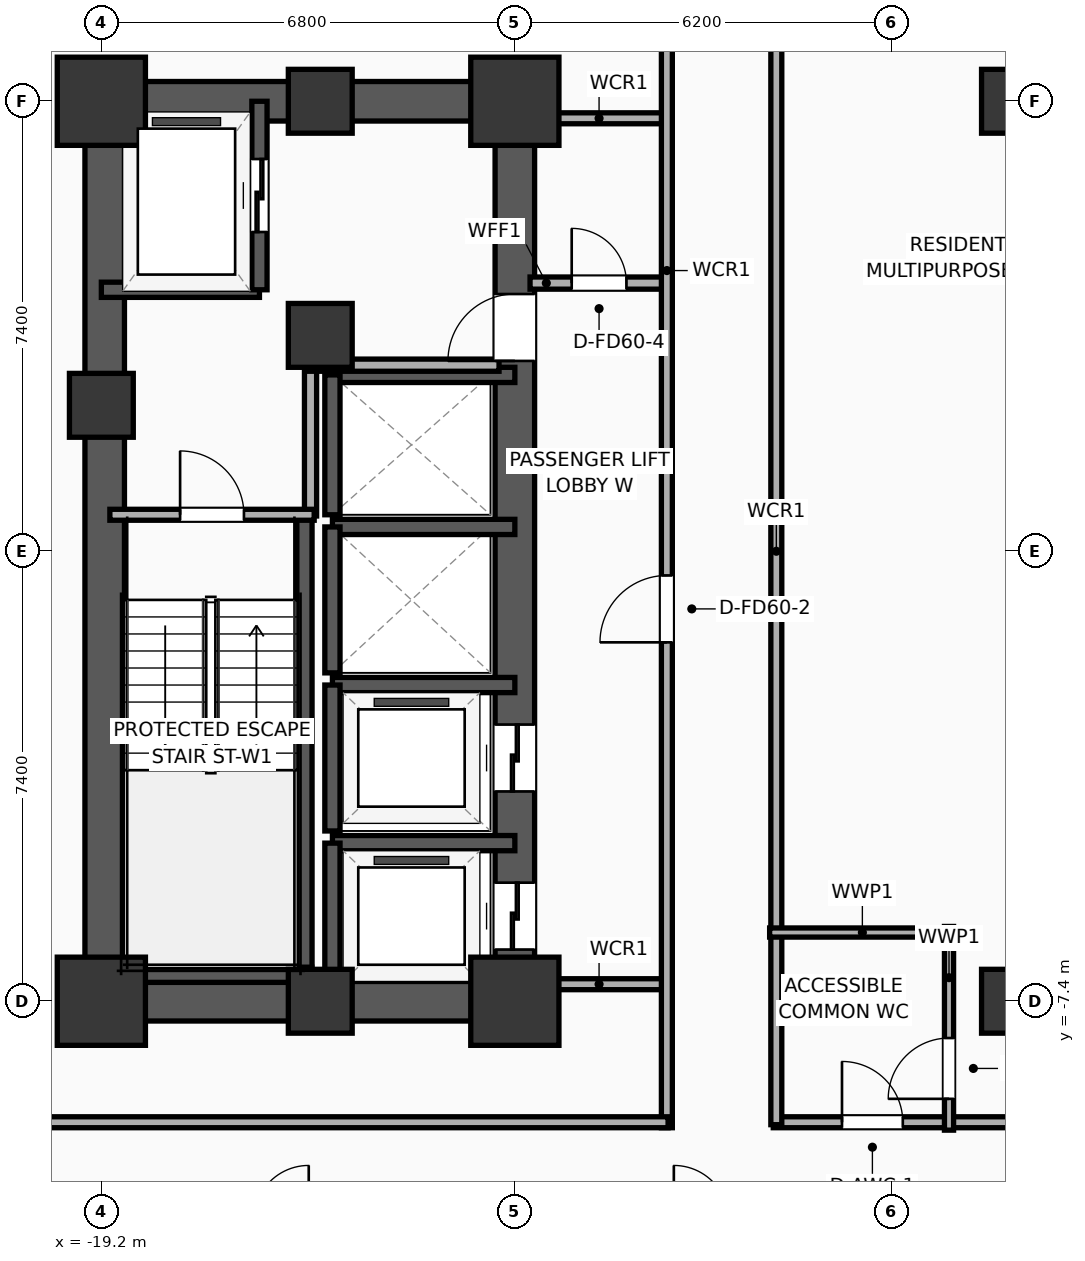
"""IFC4 building model, lengths in metres.
Left out: names, types, materials, properties, quantities, classifications, styles, units other than length and angle.
Written with IfcOpenShell. Run it as: python <this file> out.ifc"""

import sys

from ifc_helpers import new_model, si_unit, direction, frame, frame_2d, origin, origin_2d, place, context, subcontext, project, spatial, rectangle, extrude, element, fill, save


model = new_model("IFC4")
c1 = context("Model", 3, precision=1e-05, world=origin(), true_north=direction((0.0, 1.0)))
c2 = subcontext(c1, "Body", "Model", "MODEL_VIEW")
j1 = project(units=[si_unit("LENGTHUNIT", "METRE"), si_unit("PLANEANGLEUNIT", "RADIAN")], contexts=[c1])
p1 = place(None, origin())
s1 = spatial("IfcSite", under=j1, at=p1, CompositionType="ELEMENT")
p2 = place(p1, origin())
s2 = spatial("IfcBuilding", under=s1, at=p2, CompositionType="ELEMENT")
p3 = place(p2, frame((0.0, 0.0, 65.0)))
s3 = spatial("IfcBuildingStorey", under=s2, at=p3, CompositionType="ELEMENT", Elevation=65.0)
p4 = place(p3, frame((-19.2, -7.4, 0.0), z_axis=(0.0, 0.0, 1.0), x_axis=(1.0, 0.0, 0.0)))
e1 = element("IfcColumn", 1, at=p4, inside=s3, PredefinedType="COLUMN", context=c2, shape_type="SweptSolid", body=[
    extrude(rectangle(XDim=1.45, YDim=1.45, at=origin_2d()), origin(), (0.0, 0.0, 1.0), 3.9),
])
p5 = place(p3, frame((-19.2, 2.4, 0.0), z_axis=(0.0, 0.0, 1.0), x_axis=(1.0, 0.0, 0.0)))
e2 = element("IfcColumn", 2, at=p5, inside=s3, PredefinedType="COLUMN", context=c2, shape_type="SweptSolid", body=[
    extrude(rectangle(XDim=1.05, YDim=1.05, at=origin_2d()), origin(), (0.0, 0.0, 1.0), 3.9),
])
p6 = place(p3, frame((-19.2, 7.4, 0.0), z_axis=(0.0, 0.0, 1.0), x_axis=(1.0, 0.0, 0.0)))
e3 = element("IfcColumn", 3, at=p6, inside=s3, PredefinedType="COLUMN", context=c2, shape_type="SweptSolid", body=[
    extrude(rectangle(XDim=1.45, YDim=1.45, at=origin_2d()), origin(), (0.0, 0.0, 1.0), 3.9),
])
for number, where, z_axis, x_axis in (
    (4, (-15.6, -7.4, 0.0), (0.0, 0.0, 1.0), (1.0, 0.0, 0.0)),
    (5, (-15.6, 7.4, 0.0), (0.0, 0.0, 1.0), (1.0, 0.0, 0.0)),
):
    element("IfcColumn", number, at=place(p3, frame(where, z_axis=z_axis, x_axis=x_axis)), inside=s3, PredefinedType="COLUMN", context=c2, shape_type="SweptSolid", body=[
        extrude(rectangle(XDim=1.05, YDim=1.05, at=origin_2d()), origin(), (0.0, 0.0, 1.0), 3.9),
    ])
p7 = place(p3, frame((-12.4, -7.4, 0.0), z_axis=(0.0, 0.0, 1.0), x_axis=(1.0, 0.0, 0.0)))
e6 = element("IfcColumn", 6, at=p7, inside=s3, PredefinedType="COLUMN", context=c2, shape_type="SweptSolid", body=[
    extrude(rectangle(XDim=1.45, YDim=1.45, at=origin_2d()), origin(), (0.0, 0.0, 1.0), 3.9),
])
p8 = place(p3, frame((-15.6, 3.55, 0.0), z_axis=(0.0, 0.0, 1.0), x_axis=(1.0, 0.0, 0.0)))
e7 = element("IfcColumn", 7, at=p8, inside=s3, PredefinedType="COLUMN", context=c2, shape_type="SweptSolid", body=[
    extrude(rectangle(XDim=1.05, YDim=1.05, at=origin_2d()), origin(), (0.0, 0.0, 1.0), 3.9),
])
p9 = place(p3, frame((-12.4, 7.4, 0.0), z_axis=(0.0, 0.0, 1.0), x_axis=(1.0, 0.0, 0.0)))
e8 = element("IfcColumn", 8, at=p9, inside=s3, PredefinedType="COLUMN", context=c2, shape_type="SweptSolid", body=[
    extrude(rectangle(XDim=1.45, YDim=1.45, at=origin_2d()), origin(), (0.0, 0.0, 1.0), 3.9),
])
for number, where, z_axis, x_axis in (
    (9, (-19.525, -7.4, 0.0), (0.0, 0.0, 1.0), (1.0, 0.0, 0.0)),
    (10, (-19.525, 7.4, 0.0), (0.0, 0.0, 1.0), (1.0, 0.0, 0.0)),
):
    element("IfcWall", number, at=place(p3, frame(where, z_axis=z_axis, x_axis=x_axis)), inside=s3, PredefinedType="SHEAR", context=c2, shape_type="SweptSolid", body=[
        extrude(rectangle(XDim=7.45, YDim=0.65, at=frame_2d((3.725, 0.0))), origin(), (0.0, 0.0, 1.0), 3.65),
    ])
p10 = place(p3, frame((-19.145, -7.4, 0.0), z_axis=(0.0, 0.0, 1.0), x_axis=(0.0, 1.0, 0.0)))
e11 = element("IfcWall", 11, at=p10, inside=s3, PredefinedType="SHEAR", context=c2, shape_type="SweptSolid", body=[
    extrude(rectangle(XDim=14.8, YDim=0.65, at=frame_2d((7.4, 0.0))), origin(), (0.0, 0.0, 1.0), 3.65),
])
p11 = place(p3, frame((-12.4, -7.4, 0.0), z_axis=(0.0, 0.0, 1.0), x_axis=(0.0, 1.0, 0.0)))
e12 = element("IfcWall", 12, at=p11, inside=s3, PredefinedType="SHEAR", context=c2, shape_type="SweptSolid", body=[
    extrude(rectangle(XDim=14.8, YDim=0.65, at=frame_2d((7.4, 0.0))), origin(), (0.0, 0.0, 1.0), 3.65),
])
p12 = place(p11, frame((0.85, 0.0, 0.0)))
e13 = element("IfcOpeningElement", 13, at=p12, cuts=e12, PredefinedType="OPENING", context=c2, shape_type="SweptSolid", body=[
    extrude(rectangle(XDim=1.1, YDim=2.05, at=frame_2d((0.55, 1.025))), frame((0.0, 0.335, 0.0), z_axis=(0.0, -1.0, 0.0), x_axis=(1.0, 0.0, 0.0)), (0.0, 0.0, 1.0), 0.67),
])
p13 = place(p11, frame((3.45, 0.0, 0.0)))
e14 = element("IfcOpeningElement", 14, at=p13, cuts=e12, PredefinedType="OPENING", context=c2, shape_type="SweptSolid", body=[
    extrude(rectangle(XDim=1.1, YDim=2.05, at=frame_2d((0.55, 1.025))), frame((0.0, 0.335, 0.0), z_axis=(0.0, -1.0, 0.0), x_axis=(1.0, 0.0, 0.0)), (0.0, 0.0, 1.0), 0.67),
])
p14 = place(p11, frame((10.53, 0.0, 0.0)))
e15 = element("IfcOpeningElement", 15, at=p14, cuts=e12, PredefinedType="OPENING", context=c2, shape_type="SweptSolid", body=[
    extrude(rectangle(XDim=1.1, YDim=2.05, at=frame_2d((0.55, 1.025))), frame((0.0, 0.335, 0.0), z_axis=(0.0, -1.0, 0.0), x_axis=(1.0, 0.0, 0.0)), (0.0, 0.0, 1.0), 0.67),
])
p15 = place(p3, frame((-15.86, -7.085, 0.0), z_axis=(0.0, 0.0, 1.0), x_axis=(0.0, 1.0, 0.0)))
e16 = element("IfcWall", 16, at=p15, inside=s3, PredefinedType="SOLIDWALL", context=c2, shape_type="SweptSolid", body=[
    extrude(rectangle(XDim=7.685, YDim=0.25, at=frame_2d((3.843, 0.0))), origin(), (0.0, 0.0, 1.0), 3.65),
])
p16 = place(p3, frame((-19.2, -6.965, 0.0), z_axis=(0.0, 0.0, 1.0), x_axis=(1.0, 0.0, 0.0)))
e17 = element("IfcWall", 17, at=p16, inside=s3, PredefinedType="SOLIDWALL", context=c2, shape_type="SweptSolid", body=[
    extrude(rectangle(XDim=3.46, YDim=0.25, at=frame_2d((1.73, 0.0))), origin(), (0.0, 0.0, 1.0), 3.65),
])
for number, where, z_axis, x_axis in (
    (18, (-4.2, -7.4, 0.0), (0.0, 0.0, 1.0), (1.0, 0.0, 0.0)),
    (19, (-4.2, 7.4, 0.0), (0.0, 0.0, 1.0), (1.0, 0.0, 0.0)),
):
    element("IfcColumn", number, at=place(p3, frame(where, z_axis=z_axis, x_axis=x_axis)), inside=s3, PredefinedType="COLUMN", context=c2, shape_type="SweptSolid", body=[
        extrude(rectangle(XDim=1.05, YDim=1.05, at=origin_2d()), origin(), (0.0, 0.0, 1.0), 3.9),
    ])
p17 = place(p3, frame((-19.2, 4.3, 0.0), z_axis=(0.0, 0.0, 1.0), x_axis=(1.0, 0.0, 0.0)))
e20 = element("IfcWall", 20, at=p17, inside=s3, PredefinedType="SOLIDWALL", context=c2, shape_type="SweptSolid", body=[
    extrude(rectangle(XDim=2.6, YDim=0.25, at=frame_2d((1.3, 0.0))), origin(), (0.0, 0.0, 1.0), 3.65),
])
p18 = place(p3, frame((-16.6, 4.3, 0.0), z_axis=(0.0, 0.0, 1.0), x_axis=(0.0, 1.0, 0.0)))
e21 = element("IfcWall", 21, at=p18, inside=s3, PredefinedType="SOLIDWALL", context=c2, shape_type="SweptSolid", body=[
    extrude(rectangle(XDim=3.1, YDim=0.25, at=frame_2d((1.55, 0.0))), origin(), (0.0, 0.0, 1.0), 3.65),
])
p19 = place(p18, frame((0.95, 0.0, 0.0)))
e22 = element("IfcOpeningElement", 22, at=p19, cuts=e21, PredefinedType="OPENING", context=c2, shape_type="SweptSolid", body=[
    extrude(rectangle(XDim=1.2, YDim=2.05, at=frame_2d((0.6, 1.025))), frame((0.0, 0.135, 0.0), z_axis=(0.0, -1.0, 0.0), x_axis=(1.0, 0.0, 0.0)), (0.0, 0.0, 1.0), 0.27),
])
p20 = place(p3, frame((-12.4, -4.8, 0.0), z_axis=(0.0, 0.0, 1.0), x_axis=(-1.0, 0.0, 0.0)))
e23 = element("IfcWall", 23, at=p20, inside=s3, PredefinedType="SOLIDWALL", context=c2, shape_type="SweptSolid", body=[
    extrude(rectangle(XDim=3.0, YDim=0.25, at=frame_2d((1.5, 0.0))), origin(), (0.0, 0.0, 1.0), 3.65),
])
p21 = place(p3, frame((-15.4, -4.8, 0.0), z_axis=(0.0, 0.0, 1.0), x_axis=(0.0, -1.0, 0.0)))
e24 = element("IfcWall", 24, at=p21, inside=s3, PredefinedType="SOLIDWALL", context=c2, shape_type="SweptSolid", body=[
    extrude(rectangle(XDim=2.6, YDim=0.25, at=frame_2d((1.3, 0.0))), origin(), (0.0, 0.0, 1.0), 3.65),
])
p22 = place(p3, frame((-12.4, -2.2, 0.0), z_axis=(0.0, 0.0, 1.0), x_axis=(-1.0, 0.0, 0.0)))
e25 = element("IfcWall", 25, at=p22, inside=s3, PredefinedType="SOLIDWALL", context=c2, shape_type="SweptSolid", body=[
    extrude(rectangle(XDim=3.0, YDim=0.25, at=frame_2d((1.5, 0.0))), origin(), (0.0, 0.0, 1.0), 3.65),
])
p23 = place(p3, frame((-15.4, -2.2, 0.0), z_axis=(0.0, 0.0, 1.0), x_axis=(0.0, -1.0, 0.0)))
e26 = element("IfcWall", 26, at=p23, inside=s3, PredefinedType="SOLIDWALL", context=c2, shape_type="SweptSolid", body=[
    extrude(rectangle(XDim=2.4, YDim=0.25, at=frame_2d((1.2, 0.0))), origin(), (0.0, 0.0, 1.0), 3.65),
])
p24 = place(p3, frame((-12.4, 0.4, 0.0), z_axis=(0.0, 0.0, 1.0), x_axis=(-1.0, 0.0, 0.0)))
e27 = element("IfcWall", 27, at=p24, inside=s3, PredefinedType="SOLIDWALL", context=c2, shape_type="SweptSolid", body=[
    extrude(rectangle(XDim=3.0, YDim=0.25, at=frame_2d((1.5, 0.0))), origin(), (0.0, 0.0, 1.0), 3.65),
])
p25 = place(p3, frame((-15.4, 0.4, 0.0), z_axis=(0.0, 0.0, 1.0), x_axis=(0.0, -1.0, 0.0)))
e28 = element("IfcWall", 28, at=p25, inside=s3, PredefinedType="SOLIDWALL", context=c2, shape_type="SweptSolid", body=[
    extrude(rectangle(XDim=2.4, YDim=0.25, at=frame_2d((1.2, 0.0))), origin(), (0.0, 0.0, 1.0), 3.65),
])
p26 = place(p3, frame((-12.4, 2.9, 0.0), z_axis=(0.0, 0.0, 1.0), x_axis=(-1.0, 0.0, 0.0)))
e29 = element("IfcWall", 29, at=p26, inside=s3, PredefinedType="SOLIDWALL", context=c2, shape_type="SweptSolid", body=[
    extrude(rectangle(XDim=3.0, YDim=0.25, at=frame_2d((1.5, 0.0))), origin(), (0.0, 0.0, 1.0), 3.65),
])
p27 = place(p3, frame((-15.4, 2.9, 0.0), z_axis=(0.0, 0.0, 1.0), x_axis=(0.0, -1.0, 0.0)))
e30 = element("IfcWall", 30, at=p27, inside=s3, PredefinedType="SOLIDWALL", context=c2, shape_type="SweptSolid", body=[
    extrude(rectangle(XDim=2.3, YDim=0.25, at=frame_2d((1.15, 0.0))), origin(), (0.0, 0.0, 1.0), 3.65),
])
p28 = place(p3, frame((-15.76, 0.58, 0.0), z_axis=(0.0, 0.0, 1.0), x_axis=(0.0, 1.0, 0.0)))
e31 = element("IfcWall", 31, at=p28, inside=s3, PredefinedType="PARTITIONING", context=c2, shape_type="SweptSolid", body=[
    extrude(rectangle(XDim=2.52, YDim=0.2, at=frame_2d((1.26, 0.0))), origin(), (0.0, 0.0, 1.0), 3.65),
])
p29 = place(p3, frame((-15.82, 3.06, 0.0), z_axis=(0.0, 0.0, 1.0), x_axis=(1.0, 0.0, 0.0)))
e32 = element("IfcWall", 32, at=p29, inside=s3, PredefinedType="PARTITIONING", context=c2, shape_type="SweptSolid", body=[
    extrude(rectangle(XDim=3.16, YDim=0.2, at=frame_2d((1.58, 0.0))), origin(), (0.0, 0.0, 1.0), 3.65),
])
p30 = place(p3, frame((-19.06, 0.6, 0.0), z_axis=(0.0, 0.0, 1.0), x_axis=(1.0, 0.0, 0.0)))
e33 = element("IfcWall", 33, at=p30, inside=s3, PredefinedType="PARTITIONING", context=c2, shape_type="SweptSolid", body=[
    extrude(rectangle(XDim=3.36, YDim=0.18, at=frame_2d((1.68, 0.0))), origin(), (0.0, 0.0, 1.0), 3.65),
])
p31 = place(p30, frame((1.155, 0.0, 0.0)))
e34 = element("IfcOpeningElement", 34, at=p31, cuts=e33, PredefinedType="OPENING", context=c2, shape_type="SweptSolid", body=[
    extrude(rectangle(XDim=1.05, YDim=2.05, at=frame_2d((0.525, 1.025))), frame((0.0, 0.1, 0.0), z_axis=(0.0, -1.0, 0.0), x_axis=(1.0, 0.0, 0.0)), (0.0, 0.0, 1.0), 0.2),
])
p32 = place(p3, frame((-12.15, 4.41, 0.0), z_axis=(0.0, 0.0, 1.0), x_axis=(1.0, 0.0, 0.0)))
e35 = element("IfcWall", 35, at=p32, inside=s3, PredefinedType="PARTITIONING", context=c2, shape_type="SweptSolid", body=[
    extrude(rectangle(XDim=2.27, YDim=0.2, at=frame_2d((1.135, 0.0))), origin(), (0.0, 0.0, 1.0), 3.65),
])
p33 = place(p32, frame((0.685, 0.0, 0.0)))
e36 = element("IfcOpeningElement", 36, at=p33, cuts=e35, PredefinedType="OPENING", context=c2, shape_type="SweptSolid", body=[
    extrude(rectangle(XDim=0.9, YDim=2.05, at=frame_2d((0.45, 1.025))), frame((0.0, 0.11, 0.0), z_axis=(0.0, -1.0, 0.0), x_axis=(1.0, 0.0, 0.0)), (0.0, 0.0, 1.0), 0.22),
])
for number, where, z_axis, x_axis in (
    (37, (-12.15, 7.12, 0.0), (0.0, 0.0, 1.0), (1.0, 0.0, 0.0)),
    (38, (-12.15, -7.12, 0.0), (0.0, 0.0, 1.0), (1.0, 0.0, 0.0)),
):
    element("IfcWall", number, at=place(p3, frame(where, z_axis=z_axis, x_axis=x_axis)), inside=s3, PredefinedType="PARTITIONING", context=c2, shape_type="SweptSolid", body=[
        extrude(rectangle(XDim=2.27, YDim=0.18, at=frame_2d((1.135, 0.0))), origin(), (0.0, 0.0, 1.0), 2.94),
    ])
p34 = place(p3, frame((-9.9, -9.48, 0.0), z_axis=(0.0, 0.0, 1.0), x_axis=(0.0, 1.0, 0.0)))
e39 = element("IfcWall", 39, at=p34, inside=s3, PredefinedType="PARTITIONING", context=c2, shape_type="SweptSolid", body=[
    extrude(rectangle(XDim=18.96, YDim=0.18, at=frame_2d((9.48, 0.0))), origin(), (0.0, 0.0, 1.0), 3.65),
])
p35 = place(p34, frame((7.982, 0.0, 0.0)))
e40 = element("IfcOpeningElement", 40, at=p35, cuts=e39, PredefinedType="OPENING", context=c2, shape_type="SweptSolid", body=[
    extrude(rectangle(XDim=1.1, YDim=2.05, at=frame_2d((0.55, 1.025))), frame((0.0, 0.1, 0.0), z_axis=(0.0, -1.0, 0.0), x_axis=(1.0, 0.0, 0.0)), (0.0, 0.0, 1.0), 0.2),
])
p36 = place(p3, frame((-33.41, -9.39, 0.0), z_axis=(0.0, 0.0, 1.0), x_axis=(1.0, 0.0, 0.0)))
e41 = element("IfcWall", 41, at=p36, inside=s3, PredefinedType="PARTITIONING", context=c2, shape_type="SweptSolid", body=[
    extrude(rectangle(XDim=23.53, YDim=0.18, at=frame_2d((11.765, 0.0))), origin(), (0.0, 0.0, 1.0), 3.65),
])
p37 = place(p3, frame((-8.15, -9.39, 0.0), z_axis=(0.0, 0.0, 1.0), x_axis=(1.0, 0.0, 0.0)))
e42 = element("IfcWall", 42, at=p37, inside=s3, PredefinedType="PARTITIONING", context=c2, shape_type="SweptSolid", body=[
    extrude(rectangle(XDim=16.3, YDim=0.18, at=frame_2d((8.15, 0.0))), origin(), (0.0, 0.0, 1.0), 3.65),
])
p38 = place(p37, frame((1.13, 0.0, 0.0)))
e43 = element("IfcOpeningElement", 43, at=p38, cuts=e42, PredefinedType="OPENING", context=c2, shape_type="SweptSolid", body=[
    extrude(rectangle(XDim=1.0, YDim=2.05, at=frame_2d((0.5, 1.025))), frame((0.0, 0.1, 0.0), z_axis=(0.0, -1.0, 0.0), x_axis=(1.0, 0.0, 0.0)), (0.0, 0.0, 1.0), 0.2),
])
p39 = place(p37, frame((10.12, 0.0, 0.0)))
e44 = element("IfcOpeningElement", 44, at=p39, cuts=e42, PredefinedType="OPENING", context=c2, shape_type="SweptSolid", body=[
    extrude(rectangle(XDim=0.95, YDim=2.05, at=frame_2d((0.475, 1.025))), frame((0.0, 0.1, 0.0), z_axis=(0.0, -1.0, 0.0), x_axis=(1.0, 0.0, 0.0)), (0.0, 0.0, 1.0), 0.2),
])
p40 = place(p3, frame((-8.1, -9.43, 0.0), z_axis=(0.0, 0.0, 1.0), x_axis=(0.0, 1.0, 0.0)))
e45 = element("IfcWall", 45, at=p40, inside=s3, PredefinedType="PARTITIONING", context=c2, shape_type="SweptSolid", body=[
    extrude(rectangle(XDim=18.86, YDim=0.18, at=frame_2d((9.43, 0.0))), origin(), (0.0, 0.0, 1.0), 3.65),
])
p41 = place(p3, frame((-5.26, -9.52, 0.0), z_axis=(0.0, 0.0, 1.0), x_axis=(0.0, 1.0, 0.0)))
e46 = element("IfcWall", 46, at=p41, inside=s3, PredefinedType="PLUMBINGWALL", context=c2, shape_type="SweptSolid", body=[
    extrude(rectangle(XDim=3.35, YDim=0.15, at=frame_2d((1.675, 0.0))), origin(), (0.0, 0.0, 1.0), 3.65),
])
p42 = place(p41, frame((0.515, 0.0, 0.0)))
e47 = element("IfcOpeningElement", 47, at=p42, cuts=e46, PredefinedType="OPENING", context=c2, shape_type="SweptSolid", body=[
    extrude(rectangle(XDim=1.0, YDim=2.05, at=frame_2d((0.5, 1.025))), frame((0.0, 0.085, 0.0), z_axis=(0.0, -1.0, 0.0), x_axis=(1.0, 0.0, 0.0)), (0.0, 0.0, 1.0), 0.17),
])
p43 = place(p3, frame((-8.21, -6.27, 0.0), z_axis=(0.0, 0.0, 1.0), x_axis=(1.0, 0.0, 0.0)))
e48 = element("IfcWall", 48, at=p43, inside=s3, PredefinedType="PLUMBINGWALL", context=c2, shape_type="SweptSolid", body=[
    extrude(rectangle(XDim=3.05, YDim=0.15, at=frame_2d((1.525, 0.0))), origin(), (0.0, 0.0, 1.0), 3.65),
])
p44 = place(p19, origin())
e49 = element("IfcDoor", 49, at=p44, inside=s3, OperationType="SLIDING_TO_LEFT", PredefinedType="DOOR", context=c2, shape_type="SweptSolid", body=[
    extrude(rectangle(XDim=1.2, YDim=2.05, at=frame_2d((0.6, 1.025))), frame((0.0, 0.025, 0.0), z_axis=(0.0, -1.0, 0.0), x_axis=(1.0, 0.0, 0.0)), (0.0, 0.0, 1.0), 0.05),
])
fill(e22, e49)
p45 = place(p12, origin())
e50 = element("IfcDoor", 50, at=p45, inside=s3, OperationType="SLIDING_TO_LEFT", PredefinedType="DOOR", context=c2, shape_type="SweptSolid", body=[
    extrude(rectangle(XDim=1.1, YDim=2.05, at=frame_2d((0.55, 1.025))), frame((0.0, 0.025, 0.0), z_axis=(0.0, -1.0, 0.0), x_axis=(1.0, 0.0, 0.0)), (0.0, 0.0, 1.0), 0.05),
])
fill(e13, e50)
p46 = place(p13, origin())
e51 = element("IfcDoor", 51, at=p46, inside=s3, OperationType="SLIDING_TO_LEFT", PredefinedType="DOOR", context=c2, shape_type="SweptSolid", body=[
    extrude(rectangle(XDim=1.1, YDim=2.05, at=frame_2d((0.55, 1.025))), frame((0.0, 0.025, 0.0), z_axis=(0.0, -1.0, 0.0), x_axis=(1.0, 0.0, 0.0)), (0.0, 0.0, 1.0), 0.05),
])
fill(e14, e51)
p47 = place(p31, origin())
e52 = element("IfcDoor", 52, at=p47, inside=s3, OperationType="SINGLE_SWING_LEFT", PredefinedType="DOOR", context=c2, shape_type="SweptSolid", body=[
    extrude(rectangle(XDim=1.05, YDim=2.05, at=frame_2d((0.525, 1.025))), frame((0.0, 0.025, 0.0), z_axis=(0.0, -1.0, 0.0), x_axis=(1.0, 0.0, 0.0)), (0.0, 0.0, 1.0), 0.05),
])
fill(e34, e52)
p48 = place(p33, origin())
e53 = element("IfcDoor", 53, at=p48, inside=s3, OperationType="SINGLE_SWING_LEFT", PredefinedType="DOOR", context=c2, shape_type="SweptSolid", body=[
    extrude(rectangle(XDim=0.9, YDim=2.05, at=frame_2d((0.45, 1.025))), frame((0.0, 0.025, 0.0), z_axis=(0.0, -1.0, 0.0), x_axis=(1.0, 0.0, 0.0)), (0.0, 0.0, 1.0), 0.05),
])
fill(e36, e53)
p49 = place(p35, origin())
e54 = element("IfcDoor", 54, at=p49, inside=s3, OperationType="SINGLE_SWING_LEFT", PredefinedType="DOOR", context=c2, shape_type="SweptSolid", body=[
    extrude(rectangle(XDim=1.1, YDim=2.05, at=frame_2d((0.55, 1.025))), frame((0.0, 0.025, 0.0), z_axis=(0.0, -1.0, 0.0), x_axis=(1.0, 0.0, 0.0)), (0.0, 0.0, 1.0), 0.05),
])
fill(e40, e54)
p50 = place(p38, origin())
e55 = element("IfcDoor", 55, at=p50, inside=s3, OperationType="SINGLE_SWING_LEFT", PredefinedType="DOOR", context=c2, shape_type="SweptSolid", body=[
    extrude(rectangle(XDim=1.0, YDim=2.05, at=frame_2d((0.5, 1.025))), frame((0.0, 0.025, 0.0), z_axis=(0.0, -1.0, 0.0), x_axis=(1.0, 0.0, 0.0)), (0.0, 0.0, 1.0), 0.05),
])
fill(e43, e55)
p51 = place(p42, origin())
e56 = element("IfcDoor", 56, at=p51, inside=s3, OperationType="SINGLE_SWING_LEFT", PredefinedType="DOOR", context=c2, shape_type="SweptSolid", body=[
    extrude(rectangle(XDim=1.0, YDim=2.05, at=frame_2d((0.5, 1.025))), frame((0.0, 0.025, 0.0), z_axis=(0.0, -1.0, 0.0), x_axis=(1.0, 0.0, 0.0)), (0.0, 0.0, 1.0), 0.05),
])
fill(e47, e56)
p52 = place(p14, origin())
e57 = element("IfcDoor", 57, at=p52, inside=s3, OperationType="SINGLE_SWING_LEFT", PredefinedType="DOOR", context=c2, shape_type="SweptSolid", body=[
    extrude(rectangle(XDim=1.1, YDim=2.05, at=frame_2d((0.55, 1.025))), frame((0.0, 0.025, 0.0), z_axis=(0.0, -1.0, 0.0), x_axis=(1.0, 0.0, 0.0)), (0.0, 0.0, 1.0), 0.05),
])
fill(e15, e57)
save(model, sys.argv[1])
